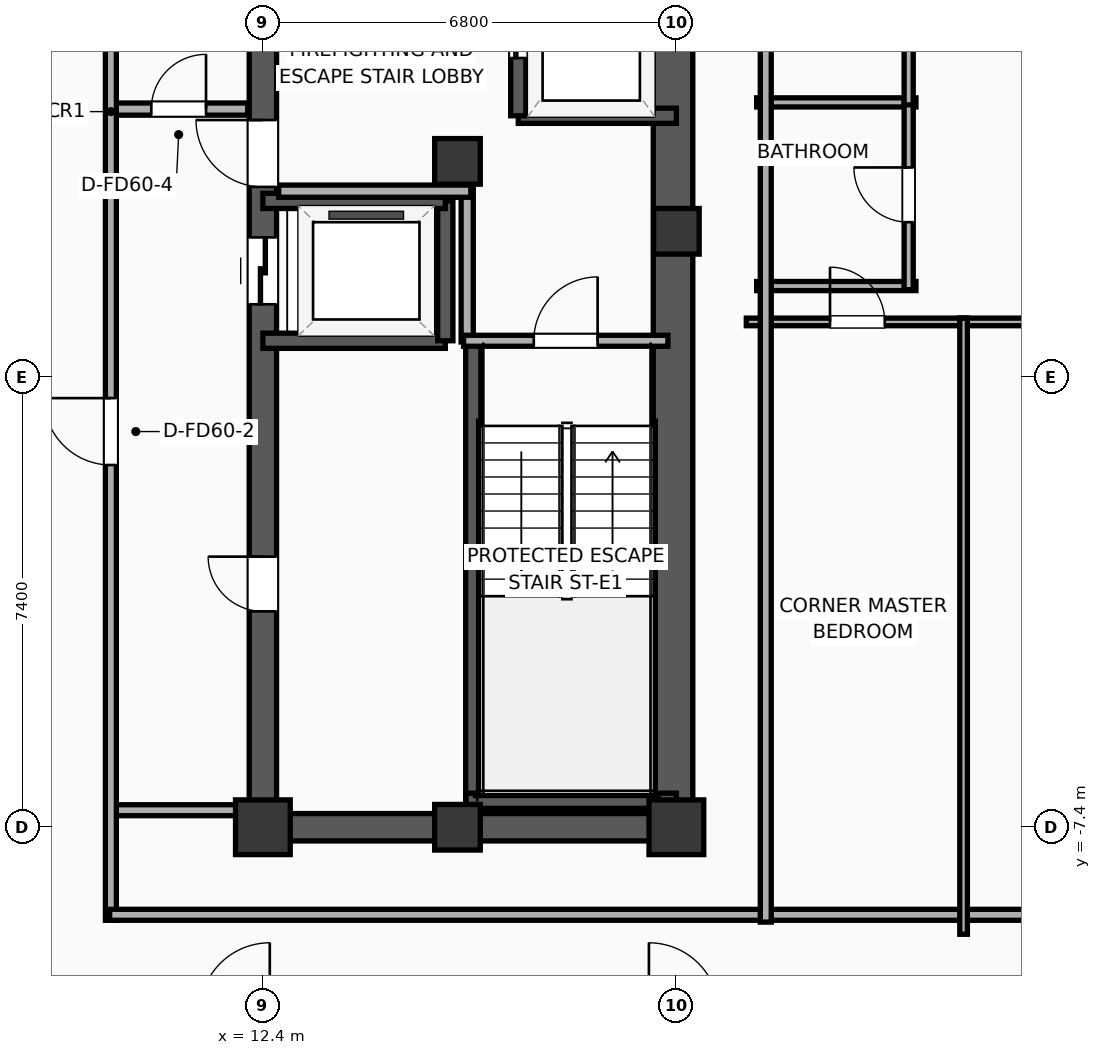
"""IFC4 building model, lengths in metres.
Left out: names, types, materials, properties, quantities, classifications, styles, units other than length and angle.
Written with IfcOpenShell. Run it as: python <this file> out.ifc"""

import sys

from ifc_helpers import new_model, si_unit, direction, frame, frame_2d, origin, origin_2d, place, context, subcontext, project, spatial, rectangle, extrude, element, fill, save


model = new_model("IFC4")
c1 = context("Model", 3, precision=1e-05, world=origin(), true_north=direction((0.0, 1.0)))
c2 = subcontext(c1, "Body", "Model", "MODEL_VIEW")
j1 = project(units=[si_unit("LENGTHUNIT", "METRE"), si_unit("PLANEANGLEUNIT", "RADIAN")], contexts=[c1])
p1 = place(None, origin())
s1 = spatial("IfcSite", under=j1, at=p1, CompositionType="ELEMENT")
p2 = place(p1, origin())
s2 = spatial("IfcBuilding", under=s1, at=p2, CompositionType="ELEMENT")
p3 = place(p2, frame((0.0, 0.0, 239.2)))
s3 = spatial("IfcBuildingStorey", under=s2, at=p3, CompositionType="ELEMENT", Elevation=239.2)
p4 = place(p3, frame((12.4, -7.4, 0.0), z_axis=(0.0, 0.0, 1.0), x_axis=(1.0, 0.0, 0.0)))
e1 = element("IfcColumn", 1, at=p4, inside=s3, PredefinedType="COLUMN", context=c2, shape_type="SweptSolid", body=[
    extrude(rectangle(XDim=0.9, YDim=0.9, at=origin_2d()), origin(), (0.0, 0.0, 1.0), 3.9),
])
for number, where, z_axis, x_axis in (
    (2, (15.6, 3.55, 0.0), (0.0, 0.0, 1.0), (1.0, 0.0, 0.0)),
    (3, (15.6, -7.4, 0.0), (0.0, 0.0, 1.0), (1.0, 0.0, 0.0)),
):
    element("IfcColumn", number, at=place(p3, frame(where, z_axis=z_axis, x_axis=x_axis)), inside=s3, PredefinedType="COLUMN", context=c2, shape_type="SweptSolid", body=[
        extrude(rectangle(XDim=0.75, YDim=0.75, at=origin_2d()), origin(), (0.0, 0.0, 1.0), 3.9),
    ])
p5 = place(p3, frame((19.2, -7.4, 0.0), z_axis=(0.0, 0.0, 1.0), x_axis=(1.0, 0.0, 0.0)))
e4 = element("IfcColumn", 4, at=p5, inside=s3, PredefinedType="COLUMN", context=c2, shape_type="SweptSolid", body=[
    extrude(rectangle(XDim=0.9, YDim=0.9, at=origin_2d()), origin(), (0.0, 0.0, 1.0), 3.9),
])
p6 = place(p3, frame((19.2, 2.4, 0.0), z_axis=(0.0, 0.0, 1.0), x_axis=(1.0, 0.0, 0.0)))
e5 = element("IfcColumn", 5, at=p6, inside=s3, PredefinedType="COLUMN", context=c2, shape_type="SweptSolid", body=[
    extrude(rectangle(XDim=0.75, YDim=0.75, at=origin_2d()), origin(), (0.0, 0.0, 1.0), 3.9),
])
p7 = place(p3, frame((12.175, -7.4, 0.0), z_axis=(0.0, 0.0, 1.0), x_axis=(1.0, 0.0, 0.0)))
e6 = element("IfcWall", 6, at=p7, inside=s3, PredefinedType="SHEAR", context=c2, shape_type="SweptSolid", body=[
    extrude(rectangle(XDim=7.25, YDim=0.45, at=frame_2d((3.625, 0.0))), origin(), (0.0, 0.0, 1.0), 3.65),
])
p8 = place(p3, frame((12.4, -7.4, 0.0), z_axis=(0.0, 0.0, 1.0), x_axis=(0.0, 1.0, 0.0)))
e7 = element("IfcWall", 7, at=p8, inside=s3, PredefinedType="SHEAR", context=c2, shape_type="SweptSolid", body=[
    extrude(rectangle(XDim=14.8, YDim=0.45, at=frame_2d((7.4, 0.0))), origin(), (0.0, 0.0, 1.0), 3.65),
])
p9 = place(p8, frame((8.6, 0.0, 0.0)))
e8 = element("IfcOpeningElement", 8, at=p9, cuts=e7, PredefinedType="OPENING", context=c2, shape_type="SweptSolid", body=[
    extrude(rectangle(XDim=1.1, YDim=2.05, at=frame_2d((0.55, 1.025))), frame((0.0, 0.235, 0.0), z_axis=(0.0, -1.0, 0.0), x_axis=(1.0, 0.0, 0.0)), (0.0, 0.0, 1.0), 0.47),
])
p10 = place(p8, frame((10.53, 0.0, 0.0)))
e9 = element("IfcOpeningElement", 9, at=p10, cuts=e7, PredefinedType="OPENING", context=c2, shape_type="SweptSolid", body=[
    extrude(rectangle(XDim=1.1, YDim=2.05, at=frame_2d((0.55, 1.025))), frame((0.0, 0.235, 0.0), z_axis=(0.0, -1.0, 0.0), x_axis=(1.0, 0.0, 0.0)), (0.0, 0.0, 1.0), 0.47),
])
p11 = place(p8, frame((3.55, 0.0, 0.0)))
e10 = element("IfcOpeningElement", 10, at=p11, cuts=e7, PredefinedType="OPENING", context=c2, shape_type="SweptSolid", body=[
    extrude(rectangle(XDim=0.9, YDim=2.05, at=frame_2d((0.45, 1.025))), frame((0.0, 0.235, 0.0), z_axis=(0.0, -1.0, 0.0), x_axis=(1.0, 0.0, 0.0)), (0.0, 0.0, 1.0), 0.47),
])
p12 = place(p3, frame((19.145, -7.4, 0.0), z_axis=(0.0, 0.0, 1.0), x_axis=(0.0, 1.0, 0.0)))
e11 = element("IfcWall", 11, at=p12, inside=s3, PredefinedType="SHEAR", context=c2, shape_type="SweptSolid", body=[
    extrude(rectangle(XDim=14.8, YDim=0.65, at=frame_2d((7.4, 0.0))), origin(), (0.0, 0.0, 1.0), 3.65),
])
p13 = place(p3, frame((15.86, -7.085, 0.0), z_axis=(0.0, 0.0, 1.0), x_axis=(0.0, 1.0, 0.0)))
e12 = element("IfcWall", 12, at=p13, inside=s3, PredefinedType="SOLIDWALL", context=c2, shape_type="SweptSolid", body=[
    extrude(rectangle(XDim=7.685, YDim=0.25, at=frame_2d((3.843, 0.0))), origin(), (0.0, 0.0, 1.0), 3.65),
])
p14 = place(p3, frame((15.74, -6.965, 0.0), z_axis=(0.0, 0.0, 1.0), x_axis=(1.0, 0.0, 0.0)))
e13 = element("IfcWall", 13, at=p14, inside=s3, PredefinedType="SOLIDWALL", context=c2, shape_type="SweptSolid", body=[
    extrude(rectangle(XDim=3.46, YDim=0.25, at=frame_2d((1.73, 0.0))), origin(), (0.0, 0.0, 1.0), 3.65),
])
p15 = place(p3, frame((16.6, 4.3, 0.0), z_axis=(0.0, 0.0, 1.0), x_axis=(1.0, 0.0, 0.0)))
e14 = element("IfcWall", 14, at=p15, inside=s3, PredefinedType="SOLIDWALL", context=c2, shape_type="SweptSolid", body=[
    extrude(rectangle(XDim=2.6, YDim=0.25, at=frame_2d((1.3, 0.0))), origin(), (0.0, 0.0, 1.0), 3.65),
])
p16 = place(p3, frame((16.6, 7.4, 0.0), z_axis=(0.0, 0.0, 1.0), x_axis=(0.0, -1.0, 0.0)))
e15 = element("IfcWall", 15, at=p16, inside=s3, PredefinedType="SOLIDWALL", context=c2, shape_type="SweptSolid", body=[
    extrude(rectangle(XDim=3.1, YDim=0.25, at=frame_2d((1.55, 0.0))), origin(), (0.0, 0.0, 1.0), 3.65),
])
p17 = place(p16, frame((0.95, 0.0, 0.0)))
e16 = element("IfcOpeningElement", 16, at=p17, cuts=e15, PredefinedType="OPENING", context=c2, shape_type="SweptSolid", body=[
    extrude(rectangle(XDim=1.2, YDim=2.05, at=frame_2d((0.6, 1.025))), frame((0.0, 0.135, 0.0), z_axis=(0.0, -1.0, 0.0), x_axis=(1.0, 0.0, 0.0)), (0.0, 0.0, 1.0), 0.27),
])
p18 = place(p3, frame((12.4, 0.6, 0.0), z_axis=(0.0, 0.0, 1.0), x_axis=(1.0, 0.0, 0.0)))
e17 = element("IfcWall", 17, at=p18, inside=s3, PredefinedType="SOLIDWALL", context=c2, shape_type="SweptSolid", body=[
    extrude(rectangle(XDim=3.0, YDim=0.25, at=frame_2d((1.5, 0.0))), origin(), (0.0, 0.0, 1.0), 3.65),
])
p19 = place(p3, frame((15.4, 0.6, 0.0), z_axis=(0.0, 0.0, 1.0), x_axis=(0.0, 1.0, 0.0)))
e18 = element("IfcWall", 18, at=p19, inside=s3, PredefinedType="SOLIDWALL", context=c2, shape_type="SweptSolid", body=[
    extrude(rectangle(XDim=2.3, YDim=0.25, at=frame_2d((1.15, 0.0))), origin(), (0.0, 0.0, 1.0), 3.65),
])
p20 = place(p3, frame((15.4, 2.9, 0.0), z_axis=(0.0, 0.0, 1.0), x_axis=(-1.0, 0.0, 0.0)))
e19 = element("IfcWall", 19, at=p20, inside=s3, PredefinedType="SOLIDWALL", context=c2, shape_type="SweptSolid", body=[
    extrude(rectangle(XDim=3.0, YDim=0.25, at=frame_2d((1.5, 0.0))), origin(), (0.0, 0.0, 1.0), 3.65),
])
p21 = place(p3, frame((15.76, 0.58, 0.0), z_axis=(0.0, 0.0, 1.0), x_axis=(0.0, 1.0, 0.0)))
e20 = element("IfcWall", 20, at=p21, inside=s3, PredefinedType="PARTITIONING", context=c2, shape_type="SweptSolid", body=[
    extrude(rectangle(XDim=2.52, YDim=0.2, at=frame_2d((1.26, 0.0))), origin(), (0.0, 0.0, 1.0), 3.65),
])
p22 = place(p3, frame((12.66, 3.06, 0.0), z_axis=(0.0, 0.0, 1.0), x_axis=(1.0, 0.0, 0.0)))
e21 = element("IfcWall", 21, at=p22, inside=s3, PredefinedType="PARTITIONING", context=c2, shape_type="SweptSolid", body=[
    extrude(rectangle(XDim=3.16, YDim=0.2, at=frame_2d((1.58, 0.0))), origin(), (0.0, 0.0, 1.0), 3.65),
])
p23 = place(p3, frame((15.7, 0.6, 0.0), z_axis=(0.0, 0.0, 1.0), x_axis=(1.0, 0.0, 0.0)))
e22 = element("IfcWall", 22, at=p23, inside=s3, PredefinedType="PARTITIONING", context=c2, shape_type="SweptSolid", body=[
    extrude(rectangle(XDim=3.36, YDim=0.18, at=frame_2d((1.68, 0.0))), origin(), (0.0, 0.0, 1.0), 3.65),
])
p24 = place(p23, frame((1.155, 0.0, 0.0)))
e23 = element("IfcOpeningElement", 23, at=p24, cuts=e22, PredefinedType="OPENING", context=c2, shape_type="SweptSolid", body=[
    extrude(rectangle(XDim=1.05, YDim=2.05, at=frame_2d((0.525, 1.025))), frame((0.0, 0.1, 0.0), z_axis=(0.0, -1.0, 0.0), x_axis=(1.0, 0.0, 0.0)), (0.0, 0.0, 1.0), 0.2),
])
p25 = place(p3, frame((9.88, 4.41, 0.0), z_axis=(0.0, 0.0, 1.0), x_axis=(1.0, 0.0, 0.0)))
e24 = element("IfcWall", 24, at=p25, inside=s3, PredefinedType="PARTITIONING", context=c2, shape_type="SweptSolid", body=[
    extrude(rectangle(XDim=2.27, YDim=0.2, at=frame_2d((1.135, 0.0))), origin(), (0.0, 0.0, 1.0), 3.65),
])
p26 = place(p25, frame((0.685, 0.0, 0.0)))
e25 = element("IfcOpeningElement", 25, at=p26, cuts=e24, PredefinedType="OPENING", context=c2, shape_type="SweptSolid", body=[
    extrude(rectangle(XDim=0.9, YDim=2.05, at=frame_2d((0.45, 1.025))), frame((0.0, 0.11, 0.0), z_axis=(0.0, -1.0, 0.0), x_axis=(1.0, 0.0, 0.0)), (0.0, 0.0, 1.0), 0.22),
])
p27 = place(p3, frame((9.88, -7.12, 0.0), z_axis=(0.0, 0.0, 1.0), x_axis=(1.0, 0.0, 0.0)))
e26 = element("IfcWall", 26, at=p27, inside=s3, PredefinedType="PARTITIONING", context=c2, shape_type="SweptSolid", body=[
    extrude(rectangle(XDim=2.27, YDim=0.18, at=frame_2d((1.135, 0.0))), origin(), (0.0, 0.0, 1.0), 3.65),
])
p28 = place(p3, frame((9.9, -8.93, 0.0), z_axis=(0.0, 0.0, 1.0), x_axis=(0.0, 1.0, 0.0)))
e27 = element("IfcWall", 27, at=p28, inside=s3, PredefinedType="PARTITIONING", context=c2, shape_type="SweptSolid", body=[
    extrude(rectangle(XDim=17.86, YDim=0.18, at=frame_2d((8.93, 0.0))), origin(), (0.0, 0.0, 1.0), 3.65),
])
p29 = place(p28, frame((7.487, 0.0, 0.0)))
e28 = element("IfcOpeningElement", 28, at=p29, cuts=e27, PredefinedType="OPENING", context=c2, shape_type="SweptSolid", body=[
    extrude(rectangle(XDim=1.1, YDim=2.05, at=frame_2d((0.55, 1.025))), frame((0.0, 0.1, 0.0), z_axis=(0.0, -1.0, 0.0), x_axis=(1.0, 0.0, 0.0)), (0.0, 0.0, 1.0), 0.2),
])
p30 = place(p3, frame((9.88, -8.84, 0.0), z_axis=(0.0, 0.0, 1.0), x_axis=(1.0, 0.0, 0.0)))
e29 = element("IfcWall", 29, at=p30, inside=s3, PredefinedType="PARTITIONING", context=c2, shape_type="SweptSolid", body=[
    extrude(rectangle(XDim=20.35, YDim=0.18, at=frame_2d((10.175, 0.0))), origin(), (0.0, 0.0, 1.0), 3.65),
])
for number, where, z_axis, x_axis in (
    (30, (20.52, 4.52, 0.0), (0.0, 0.0, 1.0), (1.0, 0.0, 0.0)),
    (31, (20.52, 1.5, 0.0), (0.0, 0.0, 1.0), (1.0, 0.0, 0.0)),
):
    element("IfcWall", number, at=place(p3, frame(where, z_axis=z_axis, x_axis=x_axis)), inside=s3, PredefinedType="PLUMBINGWALL", context=c2, shape_type="SweptSolid", body=[
        extrude(rectangle(XDim=2.62, YDim=0.15, at=frame_2d((1.31, 0.0))), origin(), (0.0, 0.0, 1.0), 3.65),
    ])
p31 = place(p3, frame((23.02, 1.44, 0.0), z_axis=(0.0, 0.0, 1.0), x_axis=(0.0, 1.0, 0.0)))
e32 = element("IfcWall", 32, at=p31, inside=s3, PredefinedType="PLUMBINGWALL", context=c2, shape_type="SweptSolid", body=[
    extrude(rectangle(XDim=3.12, YDim=0.15, at=frame_2d((1.56, 0.0))), origin(), (0.0, 0.0, 1.0), 3.65),
])
p32 = place(p31, frame((1.11, 0.0, 0.0)))
e33 = element("IfcOpeningElement", 33, at=p32, cuts=e32, PredefinedType="OPENING", context=c2, shape_type="SweptSolid", body=[
    extrude(rectangle(XDim=0.9, YDim=2.05, at=frame_2d((0.45, 1.025))), frame((0.0, 0.085, 0.0), z_axis=(0.0, -1.0, 0.0), x_axis=(1.0, 0.0, 0.0)), (0.0, 0.0, 1.0), 0.17),
])
p33 = place(p3, frame((23.02, 4.48, 0.0), z_axis=(0.0, 0.0, 1.0), x_axis=(0.0, 1.0, 0.0)))
e34 = element("IfcWall", 34, at=p33, inside=s3, PredefinedType="PLUMBINGWALL", context=c2, shape_type="SweptSolid", body=[
    extrude(rectangle(XDim=2.48, YDim=0.15, at=frame_2d((1.24, 0.0))), origin(), (0.0, 0.0, 1.0), 3.65),
])
p34 = place(p3, frame((20.35, 0.91, 0.0), z_axis=(0.0, 0.0, 1.0), x_axis=(1.0, 0.0, 0.0)))
e35 = element("IfcWall", 35, at=p34, inside=s3, PredefinedType="PARTITIONING", context=c2, shape_type="SweptSolid", body=[
    extrude(rectangle(XDim=3.635, YDim=0.125, at=frame_2d((1.818, 0.0))), origin(), (0.0, 0.0, 1.0), 3.65),
])
p35 = place(p34, frame((1.376, 0.0, 0.0)))
e36 = element("IfcOpeningElement", 36, at=p35, cuts=e35, PredefinedType="OPENING", context=c2, shape_type="SweptSolid", body=[
    extrude(rectangle(XDim=0.9, YDim=2.05, at=frame_2d((0.45, 1.025))), frame((0.0, 0.073, 0.0), z_axis=(0.0, -1.0, 0.0), x_axis=(1.0, 0.0, 0.0)), (0.0, 0.0, 1.0), 0.145),
])
p36 = place(p3, frame((23.861, 0.91, 0.0), z_axis=(0.0, 0.0, 1.0), x_axis=(1.0, 0.0, 0.0)))
e37 = element("IfcWall", 37, at=p36, inside=s3, PredefinedType="PARTITIONING", context=c2, shape_type="SweptSolid", body=[
    extrude(rectangle(XDim=3.282, YDim=0.125, at=frame_2d((1.641, 0.0))), origin(), (0.0, 0.0, 1.0), 3.65),
])
p37 = place(p36, frame((1.191, 0.0, 0.0)))
e38 = element("IfcOpeningElement", 38, at=p37, cuts=e37, PredefinedType="OPENING", context=c2, shape_type="SweptSolid", body=[
    extrude(rectangle(XDim=0.9, YDim=2.05, at=frame_2d((0.45, 1.025))), frame((0.0, 0.073, 0.0), z_axis=(0.0, -1.0, 0.0), x_axis=(1.0, 0.0, 0.0)), (0.0, 0.0, 1.0), 0.145),
])
p38 = place(p3, frame((23.923, -9.16, 0.0), z_axis=(0.0, 0.0, 1.0), x_axis=(0.0, 1.0, 0.0)))
e39 = element("IfcWall", 39, at=p38, inside=s3, PredefinedType="PARTITIONING", context=c2, shape_type="SweptSolid", body=[
    extrude(rectangle(XDim=10.13, YDim=0.125, at=frame_2d((5.065, 0.0))), origin(), (0.0, 0.0, 1.0), 3.65),
])
p39 = place(p3, frame((20.67, -8.96, 0.0), z_axis=(0.0, 0.0, 1.0), x_axis=(0.0, 1.0, 0.0)))
e40 = element("IfcWall", 40, at=p39, inside=s3, PredefinedType="PARTITIONING", context=c2, shape_type="SweptSolid", body=[
    extrude(rectangle(XDim=17.92, YDim=0.18, at=frame_2d((8.96, 0.0))), origin(), (0.0, 0.0, 1.0), 3.65),
])
p40 = place(p17, origin())
e41 = element("IfcDoor", 41, at=p40, inside=s3, OperationType="SLIDING_TO_LEFT", PredefinedType="DOOR", context=c2, shape_type="SweptSolid", body=[
    extrude(rectangle(XDim=1.2, YDim=2.05, at=frame_2d((0.6, 1.025))), frame((0.0, 0.025, 0.0), z_axis=(0.0, -1.0, 0.0), x_axis=(1.0, 0.0, 0.0)), (0.0, 0.0, 1.0), 0.05),
])
fill(e16, e41)
p41 = place(p9, origin())
e42 = element("IfcDoor", 42, at=p41, inside=s3, OperationType="SLIDING_TO_LEFT", PredefinedType="DOOR", context=c2, shape_type="SweptSolid", body=[
    extrude(rectangle(XDim=1.1, YDim=2.05, at=frame_2d((0.55, 1.025))), frame((0.0, 0.025, 0.0), z_axis=(0.0, -1.0, 0.0), x_axis=(1.0, 0.0, 0.0)), (0.0, 0.0, 1.0), 0.05),
])
fill(e8, e42)
p42 = place(p24, origin())
e43 = element("IfcDoor", 43, at=p42, inside=s3, OperationType="SINGLE_SWING_RIGHT", PredefinedType="DOOR", context=c2, shape_type="SweptSolid", body=[
    extrude(rectangle(XDim=1.05, YDim=2.05, at=frame_2d((0.525, 1.025))), frame((0.0, 0.025, 0.0), z_axis=(0.0, -1.0, 0.0), x_axis=(1.0, 0.0, 0.0)), (0.0, 0.0, 1.0), 0.05),
])
fill(e23, e43)
p43 = place(p26, origin())
e44 = element("IfcDoor", 44, at=p43, inside=s3, OperationType="SINGLE_SWING_RIGHT", PredefinedType="DOOR", context=c2, shape_type="SweptSolid", body=[
    extrude(rectangle(XDim=0.9, YDim=2.05, at=frame_2d((0.45, 1.025))), frame((0.0, 0.025, 0.0), z_axis=(0.0, -1.0, 0.0), x_axis=(1.0, 0.0, 0.0)), (0.0, 0.0, 1.0), 0.05),
])
fill(e25, e44)
p44 = place(p29, origin())
e45 = element("IfcDoor", 45, at=p44, inside=s3, OperationType="SINGLE_SWING_RIGHT", PredefinedType="DOOR", context=c2, shape_type="SweptSolid", body=[
    extrude(rectangle(XDim=1.1, YDim=2.05, at=frame_2d((0.55, 1.025))), frame((0.0, 0.025, 0.0), z_axis=(0.0, -1.0, 0.0), x_axis=(1.0, 0.0, 0.0)), (0.0, 0.0, 1.0), 0.05),
])
fill(e28, e45)
p45 = place(p32, origin())
e46 = element("IfcDoor", 46, at=p45, inside=s3, OperationType="SINGLE_SWING_RIGHT", PredefinedType="DOOR", context=c2, shape_type="SweptSolid", body=[
    extrude(rectangle(XDim=0.9, YDim=2.05, at=frame_2d((0.45, 1.025))), frame((0.0, 0.025, 0.0), z_axis=(0.0, -1.0, 0.0), x_axis=(1.0, 0.0, 0.0)), (0.0, 0.0, 1.0), 0.05),
])
fill(e33, e46)
p46 = place(p35, origin())
e47 = element("IfcDoor", 47, at=p46, inside=s3, OperationType="SINGLE_SWING_LEFT", PredefinedType="DOOR", context=c2, shape_type="SweptSolid", body=[
    extrude(rectangle(XDim=0.9, YDim=2.05, at=frame_2d((0.45, 1.025))), frame((0.0, 0.025, 0.0), z_axis=(0.0, -1.0, 0.0), x_axis=(1.0, 0.0, 0.0)), (0.0, 0.0, 1.0), 0.05),
])
fill(e36, e47)
p47 = place(p10, origin())
e48 = element("IfcDoor", 48, at=p47, inside=s3, OperationType="SINGLE_SWING_RIGHT", PredefinedType="DOOR", context=c2, shape_type="SweptSolid", body=[
    extrude(rectangle(XDim=1.1, YDim=2.05, at=frame_2d((0.55, 1.025))), frame((0.0, 0.025, 0.0), z_axis=(0.0, -1.0, 0.0), x_axis=(1.0, 0.0, 0.0)), (0.0, 0.0, 1.0), 0.05),
])
fill(e9, e48)
p48 = place(p11, origin())
e49 = element("IfcDoor", 49, at=p48, inside=s3, OperationType="SINGLE_SWING_RIGHT", PredefinedType="DOOR", context=c2, shape_type="SweptSolid", body=[
    extrude(rectangle(XDim=0.9, YDim=2.05, at=frame_2d((0.45, 1.025))), frame((0.0, 0.025, 0.0), z_axis=(0.0, -1.0, 0.0), x_axis=(1.0, 0.0, 0.0)), (0.0, 0.0, 1.0), 0.05),
])
fill(e10, e49)
save(model, sys.argv[1])
